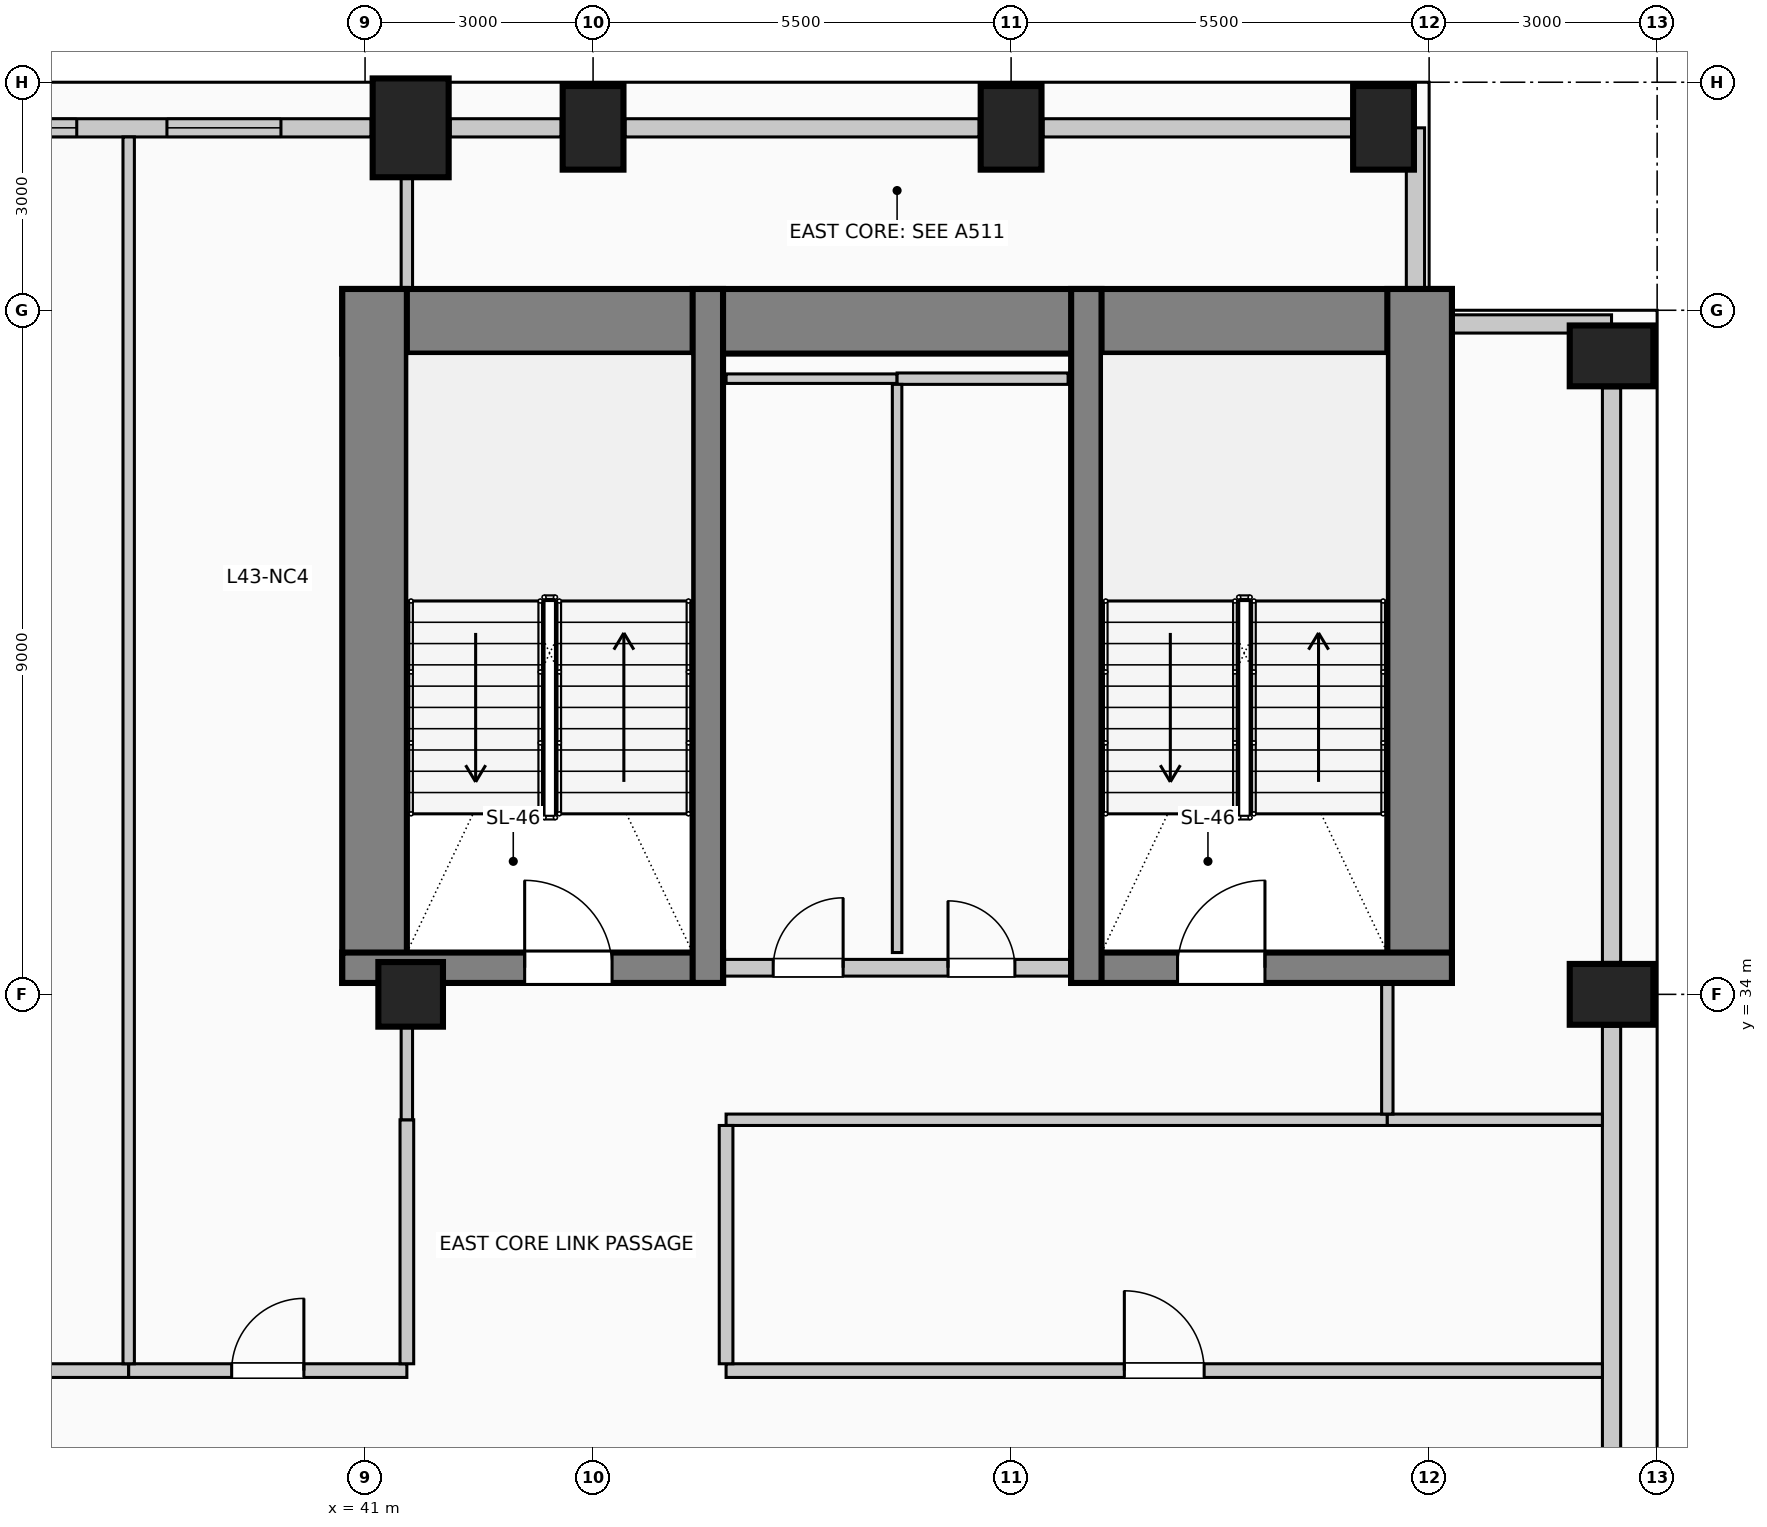
"""IFC4 building model, lengths in metres.
Left out: names, types, materials, properties, quantities, classifications, styles, units other than length and angle.
Written with IfcOpenShell. Run it as: python <this file> out.ifc"""

import sys

from ifc_helpers import new_model, si_unit, direction, frame, frame_2d, origin, origin_2d, place, context, subcontext, project, spatial, rectangle, circle, extrude, element, fill, save


model = new_model("IFC4")
c1 = context("Model", 3, precision=1e-05, world=origin(), true_north=direction((0.0, 1.0)))
c2 = subcontext(c1, "Body", "Model", "MODEL_VIEW")
j1 = project(units=[si_unit("LENGTHUNIT", "METRE"), si_unit("PLANEANGLEUNIT", "RADIAN")], contexts=[c1])
p1 = place(None, origin())
s1 = spatial("IfcSite", under=j1, at=p1, CompositionType="ELEMENT")
p2 = place(p1, origin())
s2 = spatial("IfcBuilding", under=s1, at=p2, CompositionType="ELEMENT")
p3 = place(p2, frame((0.0, 0.0, 178.6)))
s3 = spatial("IfcBuildingStorey", under=s2, at=p3, CompositionType="ELEMENT", Elevation=178.6)
p4 = place(p3, frame((40.7, 42.855, 0.0), z_axis=(0.0, 0.0, 1.0), x_axis=(1.0, 0.0, 0.0)))
e1 = element("IfcWall", 1, at=p4, inside=s3, PredefinedType="SHEAR", context=c2, shape_type="SweptSolid", body=[
    extrude(rectangle(XDim=14.6, YDim=0.85, at=frame_2d((7.3, 0.0))), origin(), (0.0, 0.0, 1.0), 4.0),
])
for number, where, z_axis, x_axis in (
    (2, (41.125, 34.15, 0.0), (0.0, 0.0, 1.0), (0.0, 1.0, 0.0)),
    (3, (54.875, 34.15, 0.0), (0.0, 0.0, 1.0), (0.0, 1.0, 0.0)),
):
    element("IfcWall", number, at=place(p3, frame(where, z_axis=z_axis, x_axis=x_axis)), inside=s3, PredefinedType="SHEAR", context=c2, shape_type="SweptSolid", body=[
        extrude(rectangle(XDim=9.13, YDim=0.85, at=frame_2d((4.565, 0.0))), origin(), (0.0, 0.0, 1.0), 4.0),
    ])
p5 = place(p3, frame((40.7, 34.35, 0.0), z_axis=(0.0, 0.0, 1.0), x_axis=(1.0, 0.0, 0.0)))
e4 = element("IfcWall", 4, at=p5, inside=s3, PredefinedType="SHEAR", context=c2, shape_type="SweptSolid", body=[
    extrude(rectangle(XDim=5.01, YDim=0.4, at=frame_2d((2.505, 0.0))), origin(), (0.0, 0.0, 1.0), 4.0),
])
p6 = place(p5, frame((2.4, 0.0, 0.0)))
e5 = element("IfcOpeningElement", 5, at=p6, cuts=e4, PredefinedType="OPENING", context=c2, shape_type="SweptSolid", body=[
    extrude(rectangle(XDim=1.15, YDim=2.2, at=frame_2d((0.575, 1.1))), frame((0.0, 0.21, 0.0), z_axis=(0.0, -1.0, 0.0), x_axis=(1.0, 0.0, 0.0)), (0.0, 0.0, 1.0), 0.42),
])
p7 = place(p3, frame((45.51, 34.15, 0.0), z_axis=(0.0, 0.0, 1.0), x_axis=(0.0, 1.0, 0.0)))
e6 = element("IfcWall", 6, at=p7, inside=s3, PredefinedType="SHEAR", context=c2, shape_type="SweptSolid", body=[
    extrude(rectangle(XDim=9.13, YDim=0.4, at=frame_2d((4.565, 0.0))), origin(), (0.0, 0.0, 1.0), 4.0),
])
p8 = place(p3, frame((50.29, 34.35, 0.0), z_axis=(0.0, 0.0, 1.0), x_axis=(1.0, 0.0, 0.0)))
e7 = element("IfcWall", 7, at=p8, inside=s3, PredefinedType="SHEAR", context=c2, shape_type="SweptSolid", body=[
    extrude(rectangle(XDim=5.01, YDim=0.4, at=frame_2d((2.505, 0.0))), origin(), (0.0, 0.0, 1.0), 4.0),
])
p9 = place(p8, frame((1.4, 0.0, 0.0)))
e8 = element("IfcOpeningElement", 8, at=p9, cuts=e7, PredefinedType="OPENING", context=c2, shape_type="SweptSolid", body=[
    extrude(rectangle(XDim=1.15, YDim=2.2, at=frame_2d((0.575, 1.1))), frame((0.0, 0.21, 0.0), z_axis=(0.0, -1.0, 0.0), x_axis=(1.0, 0.0, 0.0)), (0.0, 0.0, 1.0), 0.42),
])
p10 = place(p3, frame((50.49, 34.15, 0.0), z_axis=(0.0, 0.0, 1.0), x_axis=(0.0, 1.0, 0.0)))
e9 = element("IfcWall", 9, at=p10, inside=s3, PredefinedType="SHEAR", context=c2, shape_type="SweptSolid", body=[
    extrude(rectangle(XDim=9.13, YDim=0.4, at=frame_2d((4.565, 0.0))), origin(), (0.0, 0.0, 1.0), 4.0),
])
p11 = place(p3, frame((41.6, 45.4, 0.0), z_axis=(0.0, 0.0, 1.0), x_axis=(1.0, 0.0, 0.0)))
e10 = element("IfcColumn", 10, at=p11, inside=s3, PredefinedType="COLUMN", context=c2, shape_type="SweptSolid", body=[
    extrude(rectangle(XDim=1.0, YDim=1.3, at=origin_2d()), origin(), (0.0, 0.0, 1.0), 4.0),
])
for number, where, z_axis, x_axis in (
    (11, (44.0, 45.4, 0.0), (0.0, 0.0, 1.0), (1.0, 0.0, 0.0)),
    (12, (49.5, 45.4, 0.0), (0.0, 0.0, 1.0), (1.0, 0.0, 0.0)),
    (13, (54.4, 45.4, 0.0), (0.0, 0.0, 1.0), (1.0, 0.0, 0.0)),
    (14, (57.4, 34.0, 0.0), (0.0, 0.0, 1.0), (0.0, 1.0, 0.0)),
    (15, (57.4, 42.4, 0.0), (0.0, 0.0, 1.0), (0.0, 1.0, 0.0)),
):
    element("IfcColumn", number, at=place(p3, frame(where, z_axis=z_axis, x_axis=x_axis)), inside=s3, PredefinedType="COLUMN", context=c2, shape_type="SweptSolid", body=[
        extrude(rectangle(XDim=0.8, YDim=1.1, at=origin_2d()), origin(), (0.0, 0.0, 1.0), 4.0),
    ])
p12 = place(p3, frame((41.6, 34.0, 0.0), z_axis=(0.0, 0.0, 1.0), x_axis=(1.0, 0.0, 0.0)))
e16 = element("IfcColumn", 16, at=p12, inside=s3, PredefinedType="COLUMN", context=c2, shape_type="SweptSolid", body=[
    extrude(circle(Radius=0.425, at=origin_2d()), origin(), (0.0, 0.0, 1.0), 4.0),
])
p13 = place(p3, frame((34.52, 45.4, 0.0), z_axis=(0.0, 0.0, 1.0), x_axis=(1.0, 0.0, 0.0)))
e17 = element("IfcWall", 17, at=p13, inside=s3, PredefinedType="SOLIDWALL", context=c2, shape_type="SweptSolid", body=[
    extrude(rectangle(XDim=6.56, YDim=0.24, at=frame_2d((3.28, 0.0))), origin(), (0.0, 0.0, 1.0), 3.0),
])
p14 = place(p13, frame((1.187, 0.0, 0.42)))
e18 = element("IfcOpeningElement", 18, at=p14, cuts=e17, PredefinedType="OPENING", context=c2, shape_type="SweptSolid", body=[
    extrude(rectangle(XDim=1.5, YDim=2.2, at=frame_2d((0.75, 1.1))), frame((0.0, 0.13, 0.0), z_axis=(0.0, -1.0, 0.0), x_axis=(1.0, 0.0, 0.0)), (0.0, 0.0, 1.0), 0.26),
])
p15 = place(p13, frame((3.873, 0.0, 0.42)))
e19 = element("IfcOpeningElement", 19, at=p15, cuts=e17, PredefinedType="OPENING", context=c2, shape_type="SweptSolid", body=[
    extrude(rectangle(XDim=1.5, YDim=2.2, at=frame_2d((0.75, 1.1))), frame((0.0, 0.13, 0.0), z_axis=(0.0, -1.0, 0.0), x_axis=(1.0, 0.0, 0.0)), (0.0, 0.0, 1.0), 0.26),
])
p16 = place(p3, frame((42.12, 45.4, 0.0), z_axis=(0.0, 0.0, 1.0), x_axis=(1.0, 0.0, 0.0)))
e20 = element("IfcWall", 20, at=p16, inside=s3, PredefinedType="SOLIDWALL", context=c2, shape_type="SweptSolid", body=[
    extrude(rectangle(XDim=1.46, YDim=0.24, at=frame_2d((0.73, 0.0))), origin(), (0.0, 0.0, 1.0), 3.0),
])
p17 = place(p3, frame((44.42, 45.4, 0.0), z_axis=(0.0, 0.0, 1.0), x_axis=(1.0, 0.0, 0.0)))
e21 = element("IfcWall", 21, at=p17, inside=s3, PredefinedType="SOLIDWALL", context=c2, shape_type="SweptSolid", body=[
    extrude(rectangle(XDim=4.66, YDim=0.24, at=frame_2d((2.33, 0.0))), origin(), (0.0, 0.0, 1.0), 3.0),
])
p18 = place(p3, frame((49.92, 45.4, 0.0), z_axis=(0.0, 0.0, 1.0), x_axis=(1.0, 0.0, 0.0)))
e22 = element("IfcWall", 22, at=p18, inside=s3, PredefinedType="SOLIDWALL", context=c2, shape_type="SweptSolid", body=[
    extrude(rectangle(XDim=4.06, YDim=0.24, at=frame_2d((2.03, 0.0))), origin(), (0.0, 0.0, 1.0), 3.0),
])
p19 = place(p3, frame((57.4, 33.58, 0.0), z_axis=(0.0, 0.0, 1.0), x_axis=(0.0, -1.0, 0.0)))
e23 = element("IfcWall", 23, at=p19, inside=s3, PredefinedType="SOLIDWALL", context=c2, shape_type="SweptSolid", body=[
    extrude(rectangle(XDim=7.16, YDim=0.24, at=frame_2d((3.58, 0.0))), origin(), (0.0, 0.0, 1.0), 3.0),
])
p20 = place(p3, frame((57.4, 41.98, 0.0), z_axis=(0.0, 0.0, 1.0), x_axis=(0.0, -1.0, 0.0)))
e24 = element("IfcWall", 24, at=p20, inside=s3, PredefinedType="SOLIDWALL", context=c2, shape_type="SweptSolid", body=[
    extrude(rectangle(XDim=7.56, YDim=0.24, at=frame_2d((3.78, 0.0))), origin(), (0.0, 0.0, 1.0), 3.0),
])
p21 = place(p3, frame((54.82, 45.4, 0.0), z_axis=(0.0, 0.0, 1.0), x_axis=(0.0, -1.0, 0.0)))
e25 = element("IfcWall", 25, at=p21, inside=s3, PredefinedType="SOLIDWALL", context=c2, shape_type="SweptSolid", body=[
    extrude(rectangle(XDim=2.115, YDim=0.24, at=frame_2d((1.058, 0.0))), origin(), (0.0, 0.0, 1.0), 3.75),
])
p22 = place(p3, frame((55.305, 42.82, 0.0), z_axis=(0.0, 0.0, 1.0), x_axis=(1.0, 0.0, 0.0)))
e26 = element("IfcWall", 26, at=p22, inside=s3, PredefinedType="SOLIDWALL", context=c2, shape_type="SweptSolid", body=[
    extrude(rectangle(XDim=2.095, YDim=0.24, at=frame_2d((1.047, 0.0))), origin(), (0.0, 0.0, 1.0), 3.75),
])
p23 = place(p3, frame((45.72, 34.35, 0.0), z_axis=(0.0, 0.0, 1.0), x_axis=(1.0, 0.0, 0.0)))
e27 = element("IfcWall", 27, at=p23, inside=s3, PredefinedType="PARTITIONING", context=c2, shape_type="SweptSolid", body=[
    extrude(rectangle(XDim=4.56, YDim=0.22, at=frame_2d((2.28, 0.0))), origin(), (0.0, 0.0, 1.0), 3.75),
])
p24 = place(p23, frame((0.65, 0.0, 0.0)))
e28 = element("IfcOpeningElement", 28, at=p24, cuts=e27, PredefinedType="OPENING", context=c2, shape_type="SweptSolid", body=[
    extrude(rectangle(XDim=0.92, YDim=2.1, at=frame_2d((0.46, 1.05))), frame((0.0, 0.12, 0.0), z_axis=(0.0, -1.0, 0.0), x_axis=(1.0, 0.0, 0.0)), (0.0, 0.0, 1.0), 0.24),
])
p25 = place(p23, frame((2.95, 0.0, 0.0)))
e29 = element("IfcOpeningElement", 29, at=p25, cuts=e27, PredefinedType="OPENING", context=c2, shape_type="SweptSolid", body=[
    extrude(rectangle(XDim=0.88, YDim=2.1, at=frame_2d((0.44, 1.05))), frame((0.0, 0.12, 0.0), z_axis=(0.0, -1.0, 0.0), x_axis=(1.0, 0.0, 0.0)), (0.0, 0.0, 1.0), 0.24),
])
p26 = place(p3, frame((32.33, 29.05, 0.0), z_axis=(0.0, 0.0, 1.0), x_axis=(1.0, 0.0, 0.0)))
e30 = element("IfcWall", 30, at=p26, inside=s3, PredefinedType="PARTITIONING", context=c2, shape_type="SweptSolid", body=[
    extrude(rectangle(XDim=5.56, YDim=0.18, at=frame_2d((2.78, 0.0))), origin(), (0.0, 0.0, 1.0), 3.75),
])
p27 = place(p26, frame((2.615, 0.0, 0.0)))
e31 = element("IfcOpeningElement", 31, at=p27, cuts=e30, PredefinedType="OPENING", context=c2, shape_type="SweptSolid", body=[
    extrude(rectangle(XDim=1.05, YDim=2.15, at=frame_2d((0.525, 1.075))), frame((0.0, 0.1, 0.0), z_axis=(0.0, -1.0, 0.0), x_axis=(1.0, 0.0, 0.0)), (0.0, 0.0, 1.0), 0.2),
])
p28 = place(p3, frame((37.89, 29.05, 0.0), z_axis=(0.0, 0.0, 1.0), x_axis=(1.0, 0.0, 0.0)))
e32 = element("IfcWall", 32, at=p28, inside=s3, PredefinedType="PARTITIONING", context=c2, shape_type="SweptSolid", body=[
    extrude(rectangle(XDim=3.66, YDim=0.18, at=frame_2d((1.83, 0.0))), origin(), (0.0, 0.0, 1.0), 3.75),
])
p29 = place(p28, frame((1.355, 0.0, 0.0)))
e33 = element("IfcOpeningElement", 33, at=p29, cuts=e32, PredefinedType="OPENING", context=c2, shape_type="SweptSolid", body=[
    extrude(rectangle(XDim=0.95, YDim=2.15, at=frame_2d((0.475, 1.075))), frame((0.0, 0.1, 0.0), z_axis=(0.0, -1.0, 0.0), x_axis=(1.0, 0.0, 0.0)), (0.0, 0.0, 1.0), 0.2),
])
p30 = place(p3, frame((45.75, 29.05, 0.0), z_axis=(0.0, 0.0, 1.0), x_axis=(1.0, 0.0, 0.0)))
e34 = element("IfcWall", 34, at=p30, inside=s3, PredefinedType="PARTITIONING", context=c2, shape_type="SweptSolid", body=[
    extrude(rectangle(XDim=11.53, YDim=0.18, at=frame_2d((5.765, 0.0))), origin(), (0.0, 0.0, 1.0), 3.75),
])
p31 = place(p30, frame((5.24, 0.0, 0.0)))
e35 = element("IfcOpeningElement", 35, at=p31, cuts=e34, PredefinedType="OPENING", context=c2, shape_type="SweptSolid", body=[
    extrude(rectangle(XDim=1.05, YDim=2.15, at=frame_2d((0.525, 1.075))), frame((0.0, 0.1, 0.0), z_axis=(0.0, -1.0, 0.0), x_axis=(1.0, 0.0, 0.0)), (0.0, 0.0, 1.0), 0.2),
])
p32 = place(p3, frame((45.75, 32.35, 0.0), z_axis=(0.0, 0.0, 1.0), x_axis=(1.0, 0.0, 0.0)))
e36 = element("IfcWall", 36, at=p32, inside=s3, PredefinedType="PARTITIONING", context=c2, shape_type="SweptSolid", body=[
    extrude(rectangle(XDim=8.7, YDim=0.15, at=frame_2d((4.35, 0.0))), origin(), (0.0, 0.0, 1.0), 3.75),
])
p33 = place(p3, frame((54.45, 32.35, 0.0), z_axis=(0.0, 0.0, 1.0), x_axis=(1.0, 0.0, 0.0)))
e37 = element("IfcWall", 37, at=p33, inside=s3, PredefinedType="PARTITIONING", context=c2, shape_type="SweptSolid", body=[
    extrude(rectangle(XDim=2.83, YDim=0.15, at=frame_2d((1.415, 0.0))), origin(), (0.0, 0.0, 1.0), 3.75),
])
p34 = place(p3, frame((45.75, 42.1, 0.0), z_axis=(0.0, 0.0, 1.0), x_axis=(1.0, 0.0, 0.0)))
e38 = element("IfcWall", 38, at=p34, inside=s3, PredefinedType="PARTITIONING", context=c2, shape_type="SweptSolid", body=[
    extrude(rectangle(XDim=2.25, YDim=0.125, at=frame_2d((1.125, 0.0))), origin(), (0.0, 0.0, 1.0), 3.75),
])
p35 = place(p3, frame((48.0, 42.1, 0.0), z_axis=(0.0, 0.0, 1.0), x_axis=(1.0, 0.0, 0.0)))
e39 = element("IfcWall", 39, at=p35, inside=s3, PredefinedType="PARTITIONING", context=c2, shape_type="SweptSolid", body=[
    extrude(rectangle(XDim=2.25, YDim=0.15, at=frame_2d((1.125, 0.0))), origin(), (0.0, 0.0, 1.0), 3.75),
])
p36 = place(p3, frame((37.89, 29.14, 0.0), z_axis=(0.0, 0.0, 1.0), x_axis=(0.0, 1.0, 0.0)))
e40 = element("IfcWall", 40, at=p36, inside=s3, PredefinedType="PARTITIONING", context=c2, shape_type="SweptSolid", body=[
    extrude(rectangle(XDim=16.14, YDim=0.15, at=frame_2d((8.07, 0.0))), origin(), (0.0, 0.0, 1.0), 3.75),
])
p37 = place(p3, frame((41.55, 29.14, 0.0), z_axis=(0.0, 0.0, 1.0), x_axis=(0.0, 1.0, 0.0)))
e41 = element("IfcWall", 41, at=p37, inside=s3, PredefinedType="PARTITIONING", context=c2, shape_type="SweptSolid", body=[
    extrude(rectangle(XDim=3.21, YDim=0.18, at=frame_2d((1.605, 0.0))), origin(), (0.0, 0.0, 1.0), 3.145),
])
p38 = place(p3, frame((41.55, 32.35, 0.0), z_axis=(0.0, 0.0, 1.0), x_axis=(0.0, 1.0, 0.0)))
e42 = element("IfcWall", 42, at=p38, inside=s3, PredefinedType="PARTITIONING", context=c2, shape_type="SweptSolid", body=[
    extrude(rectangle(XDim=1.225, YDim=0.15, at=frame_2d((0.612, 0.0))), origin(), (0.0, 0.0, 1.0), 3.145),
])
p39 = place(p3, frame((41.55, 43.28, 0.0), z_axis=(0.0, 0.0, 1.0), x_axis=(0.0, 1.0, 0.0)))
e43 = element("IfcWall", 43, at=p39, inside=s3, PredefinedType="PARTITIONING", context=c2, shape_type="SweptSolid", body=[
    extrude(rectangle(XDim=1.47, YDim=0.15, at=frame_2d((0.735, 0.0))), origin(), (0.0, 0.0, 1.0), 3.75),
])
p40 = place(p3, frame((45.75, 29.14, 0.0), z_axis=(0.0, 0.0, 1.0), x_axis=(0.0, 1.0, 0.0)))
e44 = element("IfcWall", 44, at=p40, inside=s3, PredefinedType="PARTITIONING", context=c2, shape_type="SweptSolid", body=[
    extrude(rectangle(XDim=3.135, YDim=0.18, at=frame_2d((1.567, 0.0))), origin(), (0.0, 0.0, 1.0), 3.75),
])
p41 = place(p3, frame((48.0, 34.55, 0.0), z_axis=(0.0, 0.0, 1.0), x_axis=(0.0, 1.0, 0.0)))
e45 = element("IfcWall", 45, at=p41, inside=s3, PredefinedType="PARTITIONING", context=c2, shape_type="SweptSolid", body=[
    extrude(rectangle(XDim=7.475, YDim=0.125, at=frame_2d((3.737, 0.0))), origin(), (0.0, 0.0, 1.0), 3.75),
])
p42 = place(p3, frame((54.45, 32.425, 0.0), z_axis=(0.0, 0.0, 1.0), x_axis=(0.0, 1.0, 0.0)))
e46 = element("IfcWall", 46, at=p42, inside=s3, PredefinedType="PARTITIONING", context=c2, shape_type="SweptSolid", body=[
    extrude(rectangle(XDim=1.725, YDim=0.15, at=frame_2d((0.862, 0.0))), origin(), (0.0, 0.0, 1.0), 3.75),
])
p43 = place(p14, origin())
e47 = element("IfcWindow", 47, at=p43, inside=s3, PartitioningType="SINGLE_PANEL", PredefinedType="WINDOW", context=c2, shape_type="SweptSolid", body=[
    extrude(rectangle(XDim=1.5, YDim=2.2, at=frame_2d((0.75, 1.1))), frame((0.0, 0.03, 0.0), z_axis=(0.0, -1.0, 0.0), x_axis=(1.0, 0.0, 0.0)), (0.0, 0.0, 1.0), 0.06),
])
fill(e18, e47)
p44 = place(p15, origin())
e48 = element("IfcWindow", 48, at=p44, inside=s3, PartitioningType="SINGLE_PANEL", PredefinedType="WINDOW", context=c2, shape_type="SweptSolid", body=[
    extrude(rectangle(XDim=1.5, YDim=2.2, at=frame_2d((0.75, 1.1))), frame((0.0, 0.03, 0.0), z_axis=(0.0, -1.0, 0.0), x_axis=(1.0, 0.0, 0.0)), (0.0, 0.0, 1.0), 0.06),
])
fill(e19, e48)
p45 = place(p6, origin())
e49 = element("IfcDoor", 49, at=p45, inside=s3, OperationType="SINGLE_SWING_LEFT", PredefinedType="DOOR", context=c2, shape_type="SweptSolid", body=[
    extrude(rectangle(XDim=1.15, YDim=2.2, at=frame_2d((0.575, 1.1))), frame((0.0, 0.025, 0.0), z_axis=(0.0, -1.0, 0.0), x_axis=(1.0, 0.0, 0.0)), (0.0, 0.0, 1.0), 0.05),
])
fill(e5, e49)
p46 = place(p24, origin())
e50 = element("IfcDoor", 50, at=p46, inside=s3, OperationType="SINGLE_SWING_RIGHT", PredefinedType="DOOR", context=c2, shape_type="SweptSolid", body=[
    extrude(rectangle(XDim=0.92, YDim=2.1, at=frame_2d((0.46, 1.05))), frame((0.0, 0.025, 0.0), z_axis=(0.0, -1.0, 0.0), x_axis=(1.0, 0.0, 0.0)), (0.0, 0.0, 1.0), 0.05),
])
fill(e28, e50)
p47 = place(p25, origin())
e51 = element("IfcDoor", 51, at=p47, inside=s3, OperationType="SINGLE_SWING_LEFT", PredefinedType="DOOR", context=c2, shape_type="SweptSolid", body=[
    extrude(rectangle(XDim=0.88, YDim=2.1, at=frame_2d((0.44, 1.05))), frame((0.0, 0.025, 0.0), z_axis=(0.0, -1.0, 0.0), x_axis=(1.0, 0.0, 0.0)), (0.0, 0.0, 1.0), 0.05),
])
fill(e29, e51)
p48 = place(p9, origin())
e52 = element("IfcDoor", 52, at=p48, inside=s3, OperationType="SINGLE_SWING_RIGHT", PredefinedType="DOOR", context=c2, shape_type="SweptSolid", body=[
    extrude(rectangle(XDim=1.15, YDim=2.2, at=frame_2d((0.575, 1.1))), frame((0.0, 0.025, 0.0), z_axis=(0.0, -1.0, 0.0), x_axis=(1.0, 0.0, 0.0)), (0.0, 0.0, 1.0), 0.05),
])
fill(e8, e52)
p49 = place(p29, origin())
e53 = element("IfcDoor", 53, at=p49, inside=s3, OperationType="SINGLE_SWING_RIGHT", PredefinedType="DOOR", context=c2, shape_type="SweptSolid", body=[
    extrude(rectangle(XDim=0.95, YDim=2.15, at=frame_2d((0.475, 1.075))), frame((0.0, 0.025, 0.0), z_axis=(0.0, -1.0, 0.0), x_axis=(1.0, 0.0, 0.0)), (0.0, 0.0, 1.0), 0.05),
])
fill(e33, e53)
p50 = place(p31, origin())
e54 = element("IfcDoor", 54, at=p50, inside=s3, OperationType="SINGLE_SWING_LEFT", PredefinedType="DOOR", context=c2, shape_type="SweptSolid", body=[
    extrude(rectangle(XDim=1.05, YDim=2.15, at=frame_2d((0.525, 1.075))), frame((0.0, 0.025, 0.0), z_axis=(0.0, -1.0, 0.0), x_axis=(1.0, 0.0, 0.0)), (0.0, 0.0, 1.0), 0.05),
])
fill(e35, e54)
save(model, sys.argv[1])
